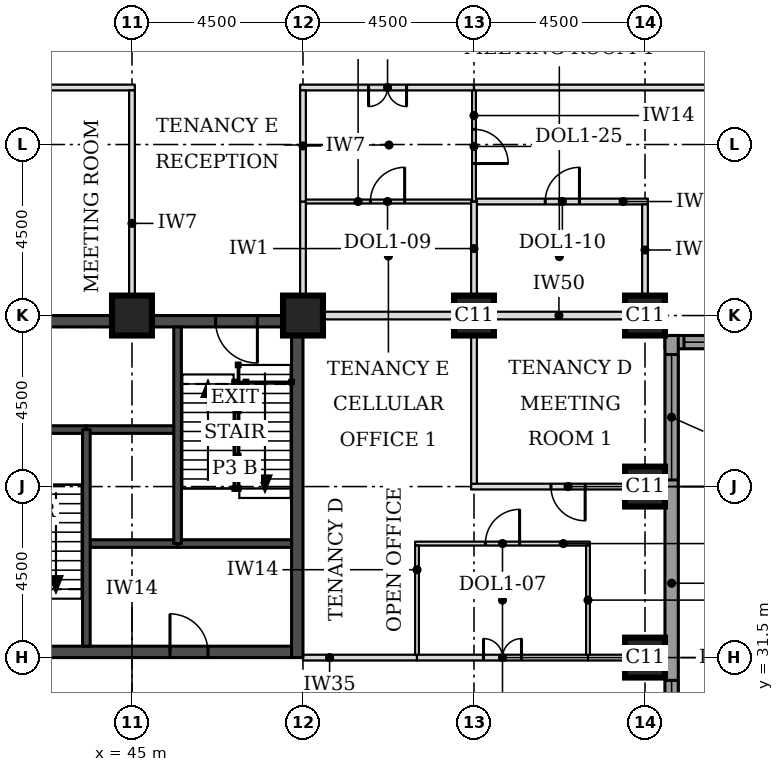
"""IFC4 building model, lengths in metres.
Left out: names, types, materials, properties, quantities, classifications, styles, units other than length and angle.
Written with IfcOpenShell. Run it as: python <this file> out.ifc"""

import sys

from ifc_helpers import new_model, si_unit, direction, frame, frame_2d, origin, origin_2d, place, context, subcontext, project, spatial, rectangle, extrude, element, fill, save


model = new_model("IFC4")
c1 = context("Model", 3, precision=1e-05, world=origin(), true_north=direction((0.0, 1.0)))
c2 = subcontext(c1, "Body", "Model", "MODEL_VIEW")
j1 = project(units=[si_unit("LENGTHUNIT", "METRE"), si_unit("PLANEANGLEUNIT", "RADIAN")], contexts=[c1])
p1 = place(None, origin())
s1 = spatial("IfcSite", under=j1, at=p1, CompositionType="ELEMENT")
p2 = place(p1, origin())
s2 = spatial("IfcBuilding", under=s1, at=p2, CompositionType="ELEMENT")
p3 = place(p2, frame((0.0, 0.0, 82.6)))
s3 = spatial("IfcBuildingStorey", under=s2, at=p3, CompositionType="ELEMENT", Elevation=82.6)
for number, where, z_axis, x_axis in (
    (1, (58.5, 31.5, 0.0), (0.0, 0.0, 1.0), (1.0, 0.0, 0.0)),
    (2, (58.5, 36.0, 0.0), (0.0, 0.0, 1.0), (1.0, 0.0, 0.0)),
    (3, (45.0, 40.5, 0.0), (0.0, 0.0, 1.0), (1.0, 0.0, 0.0)),
    (4, (49.5, 40.5, 0.0), (0.0, 0.0, 1.0), (1.0, 0.0, 0.0)),
    (5, (54.0, 40.5, 0.0), (0.0, 0.0, 1.0), (1.0, 0.0, 0.0)),
    (6, (58.5, 40.5, 0.0), (0.0, 0.0, 1.0), (1.0, 0.0, 0.0)),
):
    element("IfcColumn", number, at=place(p3, frame(where, z_axis=z_axis, x_axis=x_axis)), inside=s3, PredefinedType="COLUMN", context=c2, shape_type="SweptSolid", body=[
        extrude(rectangle(XDim=1.05, YDim=1.05, at=origin_2d()), origin(), (0.0, 0.0, 1.0), 3.7),
    ])
p4 = place(p3, frame((40.8, 31.65, 0.0), z_axis=(0.0, 0.0, 1.0), x_axis=(1.0, 0.0, 0.0)))
e7 = element("IfcWall", 7, at=p4, inside=s3, PredefinedType="SHEAR", context=c2, shape_type="SweptSolid", body=[
    extrude(rectangle(XDim=8.4, YDim=0.3, at=frame_2d((4.2, 0.0))), origin(), (0.0, 0.0, 1.0), 3.7),
])
p5 = place(p4, frame((5.2, 0.0, 0.0)))
e8 = element("IfcOpeningElement", 8, at=p5, cuts=e7, PredefinedType="OPENING", context=c2, shape_type="SweptSolid", body=[
    extrude(rectangle(XDim=1.0, YDim=2.1, at=frame_2d((0.5, 1.05))), frame((0.0, 0.16, 0.0), z_axis=(0.0, -1.0, 0.0), x_axis=(1.0, 0.0, 0.0)), (0.0, 0.0, 1.0), 0.32),
])
p6 = place(p3, frame((40.8, 40.35, 0.0), z_axis=(0.0, 0.0, 1.0), x_axis=(1.0, 0.0, 0.0)))
e9 = element("IfcWall", 9, at=p6, inside=s3, PredefinedType="SHEAR", context=c2, shape_type="SweptSolid", body=[
    extrude(rectangle(XDim=8.4, YDim=0.3, at=frame_2d((4.2, 0.0))), origin(), (0.0, 0.0, 1.0), 3.7),
])
p7 = place(p6, frame((6.4, 0.0, 0.0)))
e10 = element("IfcOpeningElement", 10, at=p7, cuts=e9, PredefinedType="OPENING", context=c2, shape_type="SweptSolid", body=[
    extrude(rectangle(XDim=1.1, YDim=2.1, at=frame_2d((0.55, 1.05))), frame((0.0, 0.16, 0.0), z_axis=(0.0, -1.0, 0.0), x_axis=(1.0, 0.0, 0.0)), (0.0, 0.0, 1.0), 0.32),
])
p8 = place(p3, frame((49.35, 31.5, 0.0), z_axis=(0.0, 0.0, 1.0), x_axis=(0.0, 1.0, 0.0)))
e11 = element("IfcWall", 11, at=p8, inside=s3, PredefinedType="SHEAR", context=c2, shape_type="SweptSolid", body=[
    extrude(rectangle(XDim=9.0, YDim=0.3, at=frame_2d((4.5, 0.0))), origin(), (0.0, 0.0, 1.0), 3.7),
])
p9 = place(p3, frame((59.025, 39.8, 0.0), z_axis=(0.0, 0.0, 1.0), x_axis=(1.0, 0.0, 0.0)))
e12 = element("IfcWall", 12, at=p9, inside=s3, PredefinedType="STANDARD", context=c2, shape_type="SweptSolid", body=[
    extrude(rectangle(XDim=13.337, YDim=0.35, at=frame_2d((6.669, 0.0))), origin(), (0.0, 0.0, 1.0), 3.525),
])
p10 = place(p9, frame((0.5, 0.0, 0.9)))
e13 = element("IfcOpeningElement", 13, at=p10, cuts=e12, PredefinedType="OPENING", context=c2, shape_type="SweptSolid", body=[
    extrude(rectangle(XDim=3.3, YDim=1.9, at=frame_2d((1.65, 0.95))), frame((0.0, 0.185, 0.0), z_axis=(0.0, -1.0, 0.0), x_axis=(1.0, 0.0, 0.0)), (0.0, 0.0, 1.0), 0.37),
])
p11 = place(p3, frame((59.2, 22.138, 0.0), z_axis=(0.0, 0.0, 1.0), x_axis=(0.0, 1.0, 0.0)))
e14 = element("IfcWall", 14, at=p11, inside=s3, PredefinedType="STANDARD", context=c2, shape_type="SweptSolid", body=[
    extrude(rectangle(XDim=17.837, YDim=0.35, at=frame_2d((8.919, 0.0))), origin(), (0.0, 0.0, 1.0), 3.525),
])
p12 = place(p11, frame((5.462, 0.0, 0.9)))
e15 = element("IfcOpeningElement", 15, at=p12, cuts=e14, PredefinedType="OPENING", context=c2, shape_type="SweptSolid", body=[
    extrude(rectangle(XDim=3.3, YDim=1.9, at=frame_2d((1.65, 0.95))), frame((0.0, 0.185, 0.0), z_axis=(0.0, -1.0, 0.0), x_axis=(1.0, 0.0, 0.0)), (0.0, 0.0, 1.0), 0.37),
])
p13 = place(p11, frame((14.037, 0.0, 0.9)))
e16 = element("IfcOpeningElement", 16, at=p13, cuts=e14, PredefinedType="OPENING", context=c2, shape_type="SweptSolid", body=[
    extrude(rectangle(XDim=3.3, YDim=1.9, at=frame_2d((1.65, 0.95))), frame((0.0, 0.185, 0.0), z_axis=(0.0, -1.0, 0.0), x_axis=(1.0, 0.0, 0.0)), (0.0, 0.0, 1.0), 0.37),
])
p14 = place(p3, frame((49.5, 31.5, 0.0), z_axis=(0.0, 0.0, 1.0), x_axis=(1.0, 0.0, 0.0)))
e17 = element("IfcWall", 17, at=p14, inside=s3, PredefinedType="PARTITIONING", context=c2, shape_type="SweptSolid", body=[
    extrude(rectangle(XDim=3.0, YDim=0.15, at=frame_2d((1.5, 0.0))), origin(), (0.0, 0.0, 1.0), 2.55),
])
p15 = place(p3, frame((52.5, 31.5, 0.0), z_axis=(0.0, 0.0, 1.0), x_axis=(1.0, 0.0, 0.0)))
e18 = element("IfcWall", 18, at=p15, inside=s3, PredefinedType="PARTITIONING", context=c2, shape_type="SweptSolid", body=[
    extrude(rectangle(XDim=4.5, YDim=0.15, at=frame_2d((2.25, 0.0))), origin(), (0.0, 0.0, 1.0), 2.55),
])
p16 = place(p15, frame((1.75, 0.0, 0.0)))
e19 = element("IfcOpeningElement", 19, at=p16, cuts=e18, PredefinedType="OPENING", context=c2, shape_type="SweptSolid", body=[
    extrude(rectangle(XDim=1.0, YDim=2.1, at=frame_2d((0.5, 1.05))), frame((0.0, 0.085, 0.0), z_axis=(0.0, -1.0, 0.0), x_axis=(1.0, 0.0, 0.0)), (0.0, 0.0, 1.0), 0.17),
])
p17 = place(p3, frame((57.0, 31.5, 0.0), z_axis=(0.0, 0.0, 1.0), x_axis=(1.0, 0.0, 0.0)))
e20 = element("IfcWall", 20, at=p17, inside=s3, PredefinedType="PARTITIONING", context=c2, shape_type="SweptSolid", body=[
    extrude(rectangle(XDim=2.025, YDim=0.15, at=frame_2d((1.012, 0.0))), origin(), (0.0, 0.0, 1.0), 2.55),
])
p18 = place(p3, frame((52.45, 34.5, 0.0), z_axis=(0.0, 0.0, 1.0), x_axis=(1.0, 0.0, 0.0)))
e21 = element("IfcWall", 21, at=p18, inside=s3, PredefinedType="PARTITIONING", context=c2, shape_type="SweptSolid", body=[
    extrude(rectangle(XDim=4.6, YDim=0.1, at=frame_2d((2.3, 0.0))), origin(), (0.0, 0.0, 1.0), 3.55),
])
p19 = place(p18, frame((1.85, 0.0, 0.0)))
e22 = element("IfcOpeningElement", 22, at=p19, cuts=e21, PredefinedType="OPENING", context=c2, shape_type="SweptSolid", body=[
    extrude(rectangle(XDim=0.9, YDim=2.1, at=frame_2d((0.45, 1.05))), frame((0.0, 0.06, 0.0), z_axis=(0.0, -1.0, 0.0), x_axis=(1.0, 0.0, 0.0)), (0.0, 0.0, 1.0), 0.12),
])
p20 = place(p3, frame((53.925, 36.0, 0.0), z_axis=(0.0, 0.0, 1.0), x_axis=(1.0, 0.0, 0.0)))
e23 = element("IfcWall", 23, at=p20, inside=s3, PredefinedType="PARTITIONING", context=c2, shape_type="SweptSolid", body=[
    extrude(rectangle(XDim=5.1, YDim=0.15, at=frame_2d((2.55, 0.0))), origin(), (0.0, 0.0, 1.0), 3.096),
])
p21 = place(p20, frame((2.1, 0.0, 0.0)))
e24 = element("IfcOpeningElement", 24, at=p21, cuts=e23, PredefinedType="OPENING", context=c2, shape_type="SweptSolid", body=[
    extrude(rectangle(XDim=0.9, YDim=2.1, at=frame_2d((0.45, 1.05))), frame((0.0, 0.085, 0.0), z_axis=(0.0, -1.0, 0.0), x_axis=(1.0, 0.0, 0.0)), (0.0, 0.0, 1.0), 0.17),
])
p22 = place(p3, frame((50.015, 40.5, 0.0), z_axis=(0.0, 0.0, 1.0), x_axis=(1.0, 0.0, 0.0)))
e25 = element("IfcWall", 25, at=p22, inside=s3, PredefinedType="PARTITIONING", context=c2, shape_type="SweptSolid", body=[
    extrude(rectangle(XDim=3.46, YDim=0.2, at=frame_2d((1.73, 0.0))), origin(), (0.0, 0.0, 1.0), 2.8),
])
p23 = place(p3, frame((54.495, 40.5, 0.0), z_axis=(0.0, 0.0, 1.0), x_axis=(1.0, 0.0, 0.0)))
e26 = element("IfcWall", 26, at=p23, inside=s3, PredefinedType="PARTITIONING", context=c2, shape_type="SweptSolid", body=[
    extrude(rectangle(XDim=3.48, YDim=0.2, at=frame_2d((1.74, 0.0))), origin(), (0.0, 0.0, 1.0), 2.8),
])
p24 = place(p3, frame((49.575, 43.5, 0.0), z_axis=(0.0, 0.0, 1.0), x_axis=(1.0, 0.0, 0.0)))
e27 = element("IfcWall", 27, at=p24, inside=s3, PredefinedType="PARTITIONING", context=c2, shape_type="SweptSolid", body=[
    extrude(rectangle(XDim=4.35, YDim=0.1, at=frame_2d((2.175, 0.0))), origin(), (0.0, 0.0, 1.0), 3.55),
])
p25 = place(p24, frame((1.7, 0.0, 0.0)))
e28 = element("IfcOpeningElement", 28, at=p25, cuts=e27, PredefinedType="OPENING", context=c2, shape_type="SweptSolid", body=[
    extrude(rectangle(XDim=0.9, YDim=2.1, at=frame_2d((0.45, 1.05))), frame((0.0, 0.06, 0.0), z_axis=(0.0, -1.0, 0.0), x_axis=(1.0, 0.0, 0.0)), (0.0, 0.0, 1.0), 0.12),
])
p26 = place(p3, frame((54.075, 43.5, 0.0), z_axis=(0.0, 0.0, 1.0), x_axis=(1.0, 0.0, 0.0)))
e29 = element("IfcWall", 29, at=p26, inside=s3, PredefinedType="PARTITIONING", context=c2, shape_type="SweptSolid", body=[
    extrude(rectangle(XDim=4.5, YDim=0.15, at=frame_2d((2.25, 0.0))), origin(), (0.0, 0.0, 1.0), 3.55),
])
p27 = place(p26, frame((1.8, 0.0, 0.0)))
e30 = element("IfcOpeningElement", 30, at=p27, cuts=e29, PredefinedType="OPENING", context=c2, shape_type="SweptSolid", body=[
    extrude(rectangle(XDim=0.9, YDim=2.1, at=frame_2d((0.45, 1.05))), frame((0.0, 0.085, 0.0), z_axis=(0.0, -1.0, 0.0), x_axis=(1.0, 0.0, 0.0)), (0.0, 0.0, 1.0), 0.17),
])
p28 = place(p3, frame((40.425, 46.5, 0.0), z_axis=(0.0, 0.0, 1.0), x_axis=(1.0, 0.0, 0.0)))
e31 = element("IfcWall", 31, at=p28, inside=s3, PredefinedType="PARTITIONING", context=c2, shape_type="SweptSolid", body=[
    extrude(rectangle(XDim=4.65, YDim=0.15, at=frame_2d((2.325, 0.0))), origin(), (0.0, 0.0, 1.0), 3.55),
])
p29 = place(p3, frame((49.425, 46.5, 0.0), z_axis=(0.0, 0.0, 1.0), x_axis=(1.0, 0.0, 0.0)))
e32 = element("IfcWall", 32, at=p29, inside=s3, PredefinedType="PARTITIONING", context=c2, shape_type="SweptSolid", body=[
    extrude(rectangle(XDim=4.575, YDim=0.15, at=frame_2d((2.288, 0.0))), origin(), (0.0, 0.0, 1.0), 3.55),
])
p30 = place(p29, frame((1.8, 0.0, 0.0)))
e33 = element("IfcOpeningElement", 33, at=p30, cuts=e32, PredefinedType="OPENING", context=c2, shape_type="SweptSolid", body=[
    extrude(rectangle(XDim=1.0, YDim=2.1, at=frame_2d((0.5, 1.05))), frame((0.0, 0.085, 0.0), z_axis=(0.0, -1.0, 0.0), x_axis=(1.0, 0.0, 0.0)), (0.0, 0.0, 1.0), 0.17),
])
p31 = place(p3, frame((54.0, 46.5, 0.0), z_axis=(0.0, 0.0, 1.0), x_axis=(1.0, 0.0, 0.0)))
e34 = element("IfcWall", 34, at=p31, inside=s3, PredefinedType="PARTITIONING", context=c2, shape_type="SweptSolid", body=[
    extrude(rectangle(XDim=16.5, YDim=0.15, at=frame_2d((8.25, 0.0))), origin(), (0.0, 0.0, 1.0), 3.55),
])
for number, where, z_axis, x_axis in (
    (35, (52.5, 31.575, 0.0), (0.0, 0.0, 1.0), (0.0, 1.0, 0.0)),
    (36, (57.0, 31.575, 0.0), (0.0, 0.0, 1.0), (0.0, 1.0, 0.0)),
):
    element("IfcWall", number, at=place(p3, frame(where, z_axis=z_axis, x_axis=x_axis)), inside=s3, PredefinedType="PARTITIONING", context=c2, shape_type="SweptSolid", body=[
        extrude(rectangle(XDim=2.875, YDim=0.1, at=frame_2d((1.438, 0.0))), origin(), (0.0, 0.0, 1.0), 3.55),
    ])
p32 = place(p3, frame((54.0, 36.075, 0.0), z_axis=(0.0, 0.0, 1.0), x_axis=(0.0, 1.0, 0.0)))
e37 = element("IfcWall", 37, at=p32, inside=s3, PredefinedType="PARTITIONING", context=c2, shape_type="SweptSolid", body=[
    extrude(rectangle(XDim=3.9, YDim=0.15, at=frame_2d((1.95, 0.0))), origin(), (0.0, 0.0, 1.0), 3.55),
])
p33 = place(p3, frame((45.0, 41.025, 0.0), z_axis=(0.0, 0.0, 1.0), x_axis=(0.0, 1.0, 0.0)))
e38 = element("IfcWall", 38, at=p33, inside=s3, PredefinedType="PARTITIONING", context=c2, shape_type="SweptSolid", body=[
    extrude(rectangle(XDim=5.4, YDim=0.15, at=frame_2d((2.7, 0.0))), origin(), (0.0, 0.0, 1.0), 3.55),
])
for number, where, z_axis, x_axis in (
    (39, (49.5, 41.025, 0.0), (0.0, 0.0, 1.0), (0.0, 1.0, 0.0)),
    (40, (54.0, 41.025, 0.0), (0.0, 0.0, 1.0), (0.0, 1.0, 0.0)),
):
    element("IfcWall", number, at=place(p3, frame(where, z_axis=z_axis, x_axis=x_axis)), inside=s3, PredefinedType="PARTITIONING", context=c2, shape_type="SweptSolid", body=[
        extrude(rectangle(XDim=2.475, YDim=0.15, at=frame_2d((1.238, 0.0))), origin(), (0.0, 0.0, 1.0), 3.55),
    ])
p34 = place(p3, frame((58.5, 41.025, 0.0), z_axis=(0.0, 0.0, 1.0), x_axis=(0.0, 1.0, 0.0)))
e41 = element("IfcWall", 41, at=p34, inside=s3, PredefinedType="PARTITIONING", context=c2, shape_type="SweptSolid", body=[
    extrude(rectangle(XDim=2.4, YDim=0.15, at=frame_2d((1.2, 0.0))), origin(), (0.0, 0.0, 1.0), 3.55),
])
p35 = place(p3, frame((49.5, 43.5, 0.0), z_axis=(0.0, 0.0, 1.0), x_axis=(0.0, 1.0, 0.0)))
e42 = element("IfcWall", 42, at=p35, inside=s3, PredefinedType="PARTITIONING", context=c2, shape_type="SweptSolid", body=[
    extrude(rectangle(XDim=2.925, YDim=0.15, at=frame_2d((1.462, 0.0))), origin(), (0.0, 0.0, 1.0), 3.55),
])
p36 = place(p3, frame((54.0, 43.5, 0.0), z_axis=(0.0, 0.0, 1.0), x_axis=(0.0, 1.0, 0.0)))
e43 = element("IfcWall", 43, at=p36, inside=s3, PredefinedType="PARTITIONING", context=c2, shape_type="SweptSolid", body=[
    extrude(rectangle(XDim=2.925, YDim=0.1, at=frame_2d((1.462, 0.0))), origin(), (0.0, 0.0, 1.0), 3.55),
])
p37 = place(p36, frame((1.0, 0.0, 0.0)))
e44 = element("IfcOpeningElement", 44, at=p37, cuts=e43, PredefinedType="OPENING", context=c2, shape_type="SweptSolid", body=[
    extrude(rectangle(XDim=0.9, YDim=2.1, at=frame_2d((0.45, 1.05))), frame((0.0, 0.06, 0.0), z_axis=(0.0, -1.0, 0.0), x_axis=(1.0, 0.0, 0.0)), (0.0, 0.0, 1.0), 0.12),
])
p38 = place(p3, frame((43.8, 34.5, 0.0), z_axis=(0.0, 0.0, 1.0), x_axis=(1.0, 0.0, 0.0)))
e45 = element("IfcWall", 45, at=p38, inside=s3, PredefinedType="SOLIDWALL", context=c2, shape_type="SweptSolid", body=[
    extrude(rectangle(XDim=2.4, YDim=0.2, at=frame_2d((1.2, 0.0))), origin(), (0.0, 0.0, 1.0), 3.55),
])
p39 = place(p3, frame((46.2, 34.5, 0.0), z_axis=(0.0, 0.0, 1.0), x_axis=(1.0, 0.0, 0.0)))
e46 = element("IfcWall", 46, at=p39, inside=s3, PredefinedType="SOLIDWALL", context=c2, shape_type="SweptSolid", body=[
    extrude(rectangle(XDim=3.0, YDim=0.2, at=frame_2d((1.5, 0.0))), origin(), (0.0, 0.0, 1.0), 3.55),
])
p40 = place(p3, frame((43.8, 37.5, 0.0), z_axis=(0.0, 0.0, 1.0), x_axis=(1.0, 0.0, 0.0)))
e47 = element("IfcWall", 47, at=p40, inside=s3, PredefinedType="SOLIDWALL", context=c2, shape_type="SweptSolid", body=[
    extrude(rectangle(XDim=2.4, YDim=0.2, at=frame_2d((1.2, 0.0))), origin(), (0.0, 0.0, 1.0), 3.7),
])
p41 = place(p3, frame((40.8, 37.5, 0.0), z_axis=(0.0, 0.0, 1.0), x_axis=(1.0, 0.0, 0.0)))
e48 = element("IfcWall", 48, at=p41, inside=s3, PredefinedType="SOLIDWALL", context=c2, shape_type="SweptSolid", body=[
    extrude(rectangle(XDim=3.0, YDim=0.2, at=frame_2d((1.5, 0.0))), origin(), (0.0, 0.0, 1.0), 3.55),
])
for number, where, z_axis, x_axis in (
    (49, (43.8, 31.8, 0.0), (0.0, 0.0, 1.0), (0.0, 1.0, 0.0)),
    (50, (46.2, 34.5, 0.0), (0.0, 0.0, 1.0), (0.0, 1.0, 0.0)),
):
    element("IfcWall", number, at=place(p3, frame(where, z_axis=z_axis, x_axis=x_axis)), inside=s3, PredefinedType="SOLIDWALL", context=c2, shape_type="SweptSolid", body=[
        extrude(rectangle(XDim=5.7, YDim=0.2, at=frame_2d((2.85, 0.0))), origin(), (0.0, 0.0, 1.0), 3.55),
    ])
p42 = place(p10, origin())
e51 = element("IfcWindow", 51, at=p42, inside=s3, PartitioningType="SINGLE_PANEL", PredefinedType="WINDOW", context=c2, shape_type="SweptSolid", body=[
    extrude(rectangle(XDim=3.3, YDim=1.9, at=frame_2d((1.65, 0.95))), frame((0.0, 0.085, 0.0), z_axis=(0.0, -1.0, 0.0), x_axis=(1.0, 0.0, 0.0)), (0.0, 0.0, 1.0), 0.06),
])
fill(e13, e51)
p43 = place(p12, origin())
e52 = element("IfcWindow", 52, at=p43, inside=s3, PartitioningType="SINGLE_PANEL", PredefinedType="WINDOW", context=c2, shape_type="SweptSolid", body=[
    extrude(rectangle(XDim=3.3, YDim=1.9, at=frame_2d((1.65, 0.95))), frame((0.0, 0.085, 0.0), z_axis=(0.0, -1.0, 0.0), x_axis=(1.0, 0.0, 0.0)), (0.0, 0.0, 1.0), 0.06),
])
fill(e15, e52)
p44 = place(p13, origin())
e53 = element("IfcWindow", 53, at=p44, inside=s3, PartitioningType="SINGLE_PANEL", PredefinedType="WINDOW", context=c2, shape_type="SweptSolid", body=[
    extrude(rectangle(XDim=3.3, YDim=1.9, at=frame_2d((1.65, 0.95))), frame((0.0, 0.085, 0.0), z_axis=(0.0, -1.0, 0.0), x_axis=(1.0, 0.0, 0.0)), (0.0, 0.0, 1.0), 0.06),
])
fill(e16, e53)
p45 = place(p16, origin())
e54 = element("IfcDoor", 54, at=p45, inside=s3, OperationType="DOUBLE_DOOR_SINGLE_SWING", PredefinedType="DOOR", context=c2, shape_type="SweptSolid", body=[
    extrude(rectangle(XDim=1.0, YDim=2.1, at=frame_2d((0.5, 1.05))), frame((0.0, 0.025, 0.0), z_axis=(0.0, -1.0, 0.0), x_axis=(1.0, 0.0, 0.0)), (0.0, 0.0, 1.0), 0.05),
])
fill(e19, e54)
p46 = place(p19, origin())
e55 = element("IfcDoor", 55, at=p46, inside=s3, OperationType="SINGLE_SWING_RIGHT", PredefinedType="DOOR", context=c2, shape_type="SweptSolid", body=[
    extrude(rectangle(XDim=0.9, YDim=2.1, at=frame_2d((0.45, 1.05))), frame((0.0, 0.025, 0.0), z_axis=(0.0, -1.0, 0.0), x_axis=(1.0, 0.0, 0.0)), (0.0, 0.0, 1.0), 0.05),
])
fill(e22, e55)
p47 = place(p21, frame((0.9, 0.0, 0.0), z_axis=(0.0, 0.0, 1.0), x_axis=(-1.0, 0.0, 0.0)))
e56 = element("IfcDoor", 56, at=p47, inside=s3, OperationType="SINGLE_SWING_LEFT", PredefinedType="DOOR", context=c2, shape_type="SweptSolid", body=[
    extrude(rectangle(XDim=0.9, YDim=2.1, at=frame_2d((0.45, 1.05))), frame((0.0, 0.025, 0.0), z_axis=(0.0, -1.0, 0.0), x_axis=(1.0, 0.0, 0.0)), (0.0, 0.0, 1.0), 0.05),
])
fill(e24, e56)
p48 = place(p30, frame((1.0, 0.0, 0.0), z_axis=(0.0, 0.0, 1.0), x_axis=(-1.0, 0.0, 0.0)))
e57 = element("IfcDoor", 57, at=p48, inside=s3, OperationType="DOUBLE_DOOR_SINGLE_SWING", PredefinedType="DOOR", context=c2, shape_type="SweptSolid", body=[
    extrude(rectangle(XDim=1.0, YDim=2.1, at=frame_2d((0.5, 1.05))), frame((0.0, 0.025, 0.0), z_axis=(0.0, -1.0, 0.0), x_axis=(1.0, 0.0, 0.0)), (0.0, 0.0, 1.0), 0.05),
])
fill(e33, e57)
p49 = place(p37, frame((0.9, 0.0, 0.0), z_axis=(0.0, 0.0, 1.0), x_axis=(-1.0, 0.0, 0.0)))
e58 = element("IfcDoor", 58, at=p49, inside=s3, OperationType="SINGLE_SWING_RIGHT", PredefinedType="DOOR", context=c2, shape_type="SweptSolid", body=[
    extrude(rectangle(XDim=0.9, YDim=2.1, at=frame_2d((0.45, 1.05))), frame((0.0, 0.025, 0.0), z_axis=(0.0, -1.0, 0.0), x_axis=(1.0, 0.0, 0.0)), (0.0, 0.0, 1.0), 0.05),
])
fill(e44, e58)
p50 = place(p25, origin())
e59 = element("IfcDoor", 59, at=p50, inside=s3, OperationType="SINGLE_SWING_RIGHT", PredefinedType="DOOR", context=c2, shape_type="SweptSolid", body=[
    extrude(rectangle(XDim=0.9, YDim=2.1, at=frame_2d((0.45, 1.05))), frame((0.0, 0.025, 0.0), z_axis=(0.0, -1.0, 0.0), x_axis=(1.0, 0.0, 0.0)), (0.0, 0.0, 1.0), 0.05),
])
fill(e28, e59)
p51 = place(p27, origin())
e60 = element("IfcDoor", 60, at=p51, inside=s3, OperationType="SINGLE_SWING_RIGHT", PredefinedType="DOOR", context=c2, shape_type="SweptSolid", body=[
    extrude(rectangle(XDim=0.9, YDim=2.1, at=frame_2d((0.45, 1.05))), frame((0.0, 0.025, 0.0), z_axis=(0.0, -1.0, 0.0), x_axis=(1.0, 0.0, 0.0)), (0.0, 0.0, 1.0), 0.05),
])
fill(e30, e60)
p52 = place(p7, frame((1.1, 0.0, 0.0), z_axis=(0.0, 0.0, 1.0), x_axis=(-1.0, 0.0, 0.0)))
e61 = element("IfcDoor", 61, at=p52, inside=s3, OperationType="SINGLE_SWING_LEFT", PredefinedType="DOOR", context=c2, shape_type="SweptSolid", body=[
    extrude(rectangle(XDim=1.1, YDim=2.1, at=frame_2d((0.55, 1.05))), frame((0.0, 0.025, 0.0), z_axis=(0.0, -1.0, 0.0), x_axis=(1.0, 0.0, 0.0)), (0.0, 0.0, 1.0), 0.05),
])
fill(e10, e61)
p53 = place(p5, origin())
e62 = element("IfcDoor", 62, at=p53, inside=s3, OperationType="SINGLE_SWING_LEFT", PredefinedType="DOOR", context=c2, shape_type="SweptSolid", body=[
    extrude(rectangle(XDim=1.0, YDim=2.1, at=frame_2d((0.5, 1.05))), frame((0.0, 0.025, 0.0), z_axis=(0.0, -1.0, 0.0), x_axis=(1.0, 0.0, 0.0)), (0.0, 0.0, 1.0), 0.05),
])
fill(e8, e62)
save(model, sys.argv[1])
